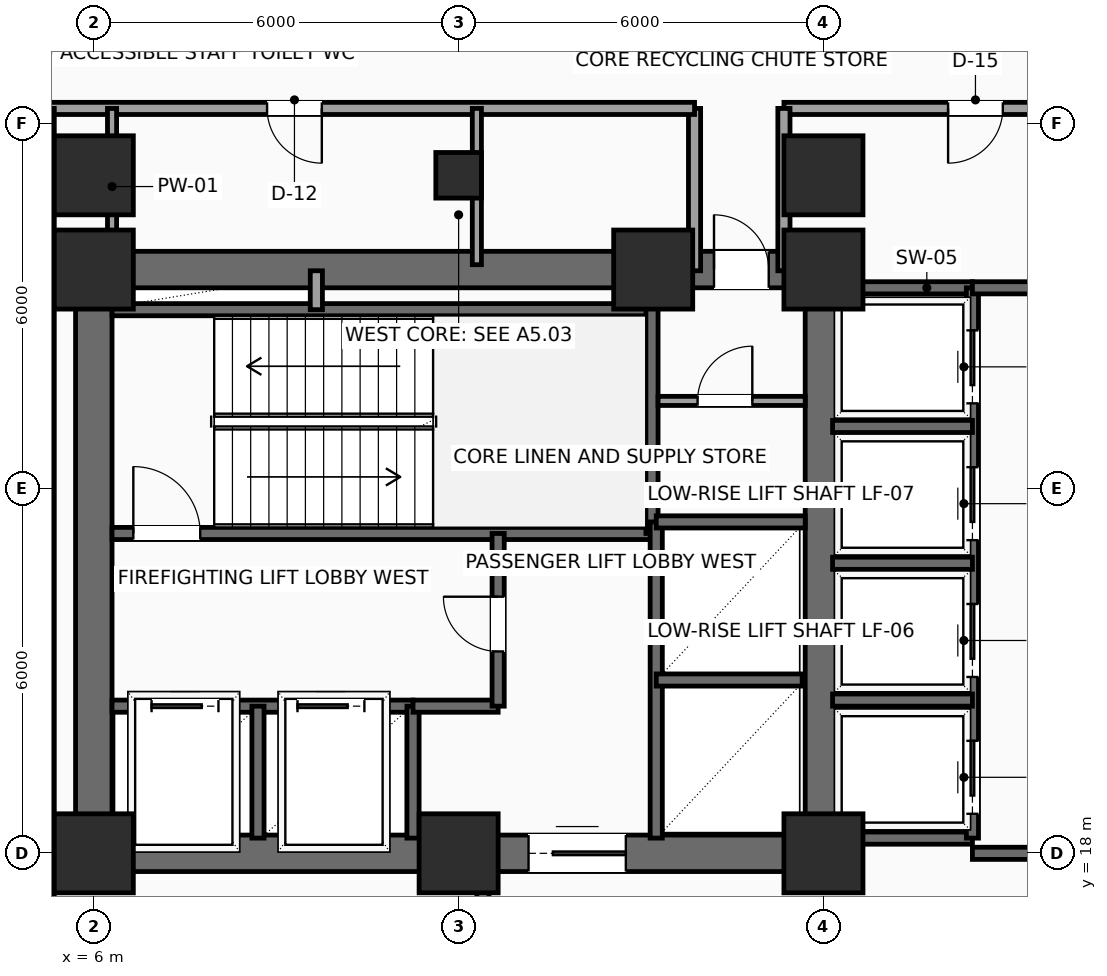
"""IFC4 building model, lengths in metres.
Left out: names, types, materials, properties, quantities, classifications, styles, units other than length and angle.
Written with IfcOpenShell. Run it as: python <this file> out.ifc"""

import sys

from ifc_helpers import new_model, si_unit, direction, frame, frame_2d, origin, origin_2d, place, context, subcontext, project, spatial, rectangle, hollow_rectangle, extrude, element, fill, save


model = new_model("IFC4")
c1 = context("Model", 3, precision=1e-05, world=origin(), true_north=direction((0.0, 1.0)))
c2 = subcontext(c1, "Body", "Model", "MODEL_VIEW")
j1 = project(units=[si_unit("LENGTHUNIT", "METRE"), si_unit("PLANEANGLEUNIT", "RADIAN")], contexts=[c1])
p1 = place(None, origin())
s1 = spatial("IfcSite", under=j1, at=p1, CompositionType="ELEMENT")
p2 = place(p1, origin())
s2 = spatial("IfcBuilding", under=s1, at=p2, CompositionType="ELEMENT")
p3 = place(p2, frame((0.0, 0.0, 48.0)))
s3 = spatial("IfcBuildingStorey", under=s2, at=p3, CompositionType="ELEMENT", Elevation=48.0)
for number, where, z_axis, x_axis in (
    (1, (6.0, 18.0, 0.0), (0.0, 0.0, 1.0), (1.0, 0.0, 0.0)),
    (2, (12.0, 18.0, 0.0), (0.0, 0.0, 1.0), (1.0, 0.0, 0.0)),
    (3, (18.0, 18.0, 0.0), (0.0, 0.0, 1.0), (1.0, 0.0, 0.0)),
    (4, (6.0, 27.6, 0.0), (0.0, 0.0, 1.0), (1.0, 0.0, 0.0)),
    (5, (15.2, 27.6, 0.0), (0.0, 0.0, 1.0), (1.0, 0.0, 0.0)),
    (6, (18.0, 27.6, 0.0), (0.0, 0.0, 1.0), (1.0, 0.0, 0.0)),
    (7, (6.0, 29.15, 0.0), (0.0, 0.0, 1.0), (1.0, 0.0, 0.0)),
):
    element("IfcColumn", number, at=place(p3, frame(where, z_axis=z_axis, x_axis=x_axis)), inside=s3, PredefinedType="COLUMN", context=c2, shape_type="SweptSolid", body=[
        extrude(rectangle(XDim=1.3, YDim=1.3, at=origin_2d()), origin(), (0.0, 0.0, 1.0), 3.9),
    ])
p4 = place(p3, frame((12.0, 29.15, 0.0), z_axis=(0.0, 0.0, 1.0), x_axis=(1.0, 0.0, 0.0)))
e8 = element("IfcColumn", 8, at=p4, inside=s3, PredefinedType="COLUMN", context=c2, shape_type="SweptSolid", body=[
    extrude(hollow_rectangle(XDim=0.75, YDim=0.75, WallThickness=0.035, InnerFilletRadius=0.035, OuterFilletRadius=0.05, at=origin_2d()), origin(), (0.0, 0.0, 1.0), 3.9),
])
p5 = place(p3, frame((18.0, 29.15, 0.0), z_axis=(0.0, 0.0, 1.0), x_axis=(1.0, 0.0, 0.0)))
e9 = element("IfcColumn", 9, at=p5, inside=s3, PredefinedType="COLUMN", context=c2, shape_type="SweptSolid", body=[
    extrude(rectangle(XDim=1.3, YDim=1.3, at=origin_2d()), origin(), (0.0, 0.0, 1.0), 3.9),
])
p6 = place(p3, frame((6.0, 18.0, 0.0), z_axis=(0.0, 0.0, 1.0), x_axis=(1.0, 0.0, 0.0)))
e10 = element("IfcWall", 10, at=p6, inside=s3, PredefinedType="SHEAR", context=c2, shape_type="SweptSolid", body=[
    extrude(rectangle(XDim=12.0, YDim=0.6, at=frame_2d((6.0, 0.0))), origin(), (0.0, 0.0, 1.0), 3.65),
])
p7 = place(p6, frame((7.15, 0.0, 0.0)))
e11 = element("IfcOpeningElement", 11, at=p7, cuts=e10, PredefinedType="OPENING", context=c2, shape_type="SweptSolid", body=[
    extrude(rectangle(XDim=1.6, YDim=2.3, at=frame_2d((0.8, 1.15))), frame((0.0, 0.31, 0.0), z_axis=(0.0, -1.0, 0.0), x_axis=(1.0, 0.0, 0.0)), (0.0, 0.0, 1.0), 0.62),
])
p8 = place(p3, frame((6.0, 27.6, 0.0), z_axis=(0.0, 0.0, 1.0), x_axis=(1.0, 0.0, 0.0)))
e12 = element("IfcWall", 12, at=p8, inside=s3, PredefinedType="SHEAR", context=c2, shape_type="SweptSolid", body=[
    extrude(rectangle(XDim=12.0, YDim=0.6, at=frame_2d((6.0, 0.0))), origin(), (0.0, 0.0, 1.0), 3.65),
])
p9 = place(p8, frame((10.2, 0.0, 0.0)))
e13 = element("IfcOpeningElement", 13, at=p9, cuts=e12, PredefinedType="OPENING", context=c2, shape_type="SweptSolid", body=[
    extrude(rectangle(XDim=0.9, YDim=2.15, at=frame_2d((0.45, 1.075))), frame((0.0, 0.31, 0.0), z_axis=(0.0, -1.0, 0.0), x_axis=(1.0, 0.0, 0.0)), (0.0, 0.0, 1.0), 0.62),
])
for number, where, z_axis, x_axis in (
    (14, (6.0, 18.0, 0.0), (0.0, 0.0, 1.0), (0.0, 1.0, 0.0)),
    (15, (18.0, 18.0, 0.0), (0.0, 0.0, 1.0), (0.0, 1.0, 0.0)),
):
    element("IfcWall", number, at=place(p3, frame(where, z_axis=z_axis, x_axis=x_axis)), inside=s3, PredefinedType="SHEAR", context=c2, shape_type="SweptSolid", body=[
        extrude(rectangle(XDim=9.6, YDim=0.6, at=frame_2d((4.8, 0.0))), origin(), (0.0, 0.0, 1.0), 3.65),
    ])
p10 = place(p3, frame((6.3, 23.26, 0.0), z_axis=(0.0, 0.0, 1.0), x_axis=(1.0, 0.0, 0.0)))
e16 = element("IfcWall", 16, at=p10, inside=s3, PredefinedType="SHEAR", context=c2, shape_type="SweptSolid", body=[
    extrude(rectangle(XDim=8.88, YDim=0.2, at=frame_2d((4.44, 0.0))), origin(), (0.0, 0.0, 1.0), 3.65),
])
p11 = place(p10, frame((0.35, 0.0, 0.0)))
e17 = element("IfcOpeningElement", 17, at=p11, cuts=e16, PredefinedType="OPENING", context=c2, shape_type="SweptSolid", body=[
    extrude(rectangle(XDim=1.1, YDim=2.2, at=frame_2d((0.55, 1.1))), frame((0.0, 0.11, 0.0), z_axis=(0.0, -1.0, 0.0), x_axis=(1.0, 0.0, 0.0)), (0.0, 0.0, 1.0), 0.22),
])
p12 = place(p3, frame((6.3, 26.94, 0.0), z_axis=(0.0, 0.0, 1.0), x_axis=(1.0, 0.0, 0.0)))
e18 = element("IfcWall", 18, at=p12, inside=s3, PredefinedType="SHEAR", context=c2, shape_type="SweptSolid", body=[
    extrude(rectangle(XDim=8.88, YDim=0.2, at=frame_2d((4.44, 0.0))), origin(), (0.0, 0.0, 1.0), 3.65),
])
p13 = place(p3, frame((15.18, 23.26, 0.0), z_axis=(0.0, 0.0, 1.0), x_axis=(0.0, 1.0, 0.0)))
e19 = element("IfcWall", 19, at=p13, inside=s3, PredefinedType="SHEAR", context=c2, shape_type="SweptSolid", body=[
    extrude(rectangle(XDim=4.04, YDim=0.2, at=frame_2d((2.02, 0.0))), origin(), (0.0, 0.0, 1.0), 3.65),
])
p14 = place(p3, frame((6.3, 20.42, 0.0), z_axis=(0.0, 0.0, 1.0), x_axis=(1.0, 0.0, 0.0)))
e20 = element("IfcWall", 20, at=p14, inside=s3, PredefinedType="SHEAR", context=c2, shape_type="SweptSolid", body=[
    extrude(rectangle(XDim=4.95, YDim=0.2, at=frame_2d((2.475, 0.0))), origin(), (0.0, 0.0, 1.0), 3.65),
])
p15 = place(p14, frame((0.65, 0.0, 0.0)))
e21 = element("IfcOpeningElement", 21, at=p15, cuts=e20, PredefinedType="OPENING", context=c2, shape_type="SweptSolid", body=[
    extrude(rectangle(XDim=1.1, YDim=2.2, at=frame_2d((0.55, 1.1))), frame((0.0, 0.11, 0.0), z_axis=(0.0, -1.0, 0.0), x_axis=(1.0, 0.0, 0.0)), (0.0, 0.0, 1.0), 0.22),
])
p16 = place(p14, frame((3.05, 0.0, 0.0)))
e22 = element("IfcOpeningElement", 22, at=p16, cuts=e20, PredefinedType="OPENING", context=c2, shape_type="SweptSolid", body=[
    extrude(rectangle(XDim=1.1, YDim=2.2, at=frame_2d((0.55, 1.1))), frame((0.0, 0.11, 0.0), z_axis=(0.0, -1.0, 0.0), x_axis=(1.0, 0.0, 0.0)), (0.0, 0.0, 1.0), 0.22),
])
for number, where, z_axis, x_axis in (
    (23, (8.7, 18.25, 0.0), (0.0, 0.0, 1.0), (0.0, 1.0, 0.0)),
    (24, (11.25, 18.25, 0.0), (0.0, 0.0, 1.0), (0.0, 1.0, 0.0)),
):
    element("IfcWall", number, at=place(p3, frame(where, z_axis=z_axis, x_axis=x_axis)), inside=s3, PredefinedType="SHEAR", context=c2, shape_type="SweptSolid", body=[
        extrude(rectangle(XDim=2.17, YDim=0.2, at=frame_2d((1.085, 0.0))), origin(), (0.0, 0.0, 1.0), 3.65),
    ])
p17 = place(p3, frame((11.25, 20.42, 0.0), z_axis=(0.0, 0.0, 1.0), x_axis=(1.0, 0.0, 0.0)))
e25 = element("IfcWall", 25, at=p17, inside=s3, PredefinedType="SHEAR", context=c2, shape_type="SweptSolid", body=[
    extrude(rectangle(XDim=1.4, YDim=0.2, at=frame_2d((0.7, 0.0))), origin(), (0.0, 0.0, 1.0), 3.65),
])
p18 = place(p3, frame((12.65, 20.42, 0.0), z_axis=(0.0, 0.0, 1.0), x_axis=(0.0, 1.0, 0.0)))
e26 = element("IfcWall", 26, at=p18, inside=s3, PredefinedType="SHEAR", context=c2, shape_type="SweptSolid", body=[
    extrude(rectangle(XDim=2.84, YDim=0.2, at=frame_2d((1.42, 0.0))), origin(), (0.0, 0.0, 1.0), 3.65),
])
p19 = place(p18, frame((0.9, 0.0, 0.0)))
e27 = element("IfcOpeningElement", 27, at=p19, cuts=e26, PredefinedType="OPENING", context=c2, shape_type="SweptSolid", body=[
    extrude(rectangle(XDim=0.9, YDim=2.15, at=frame_2d((0.45, 1.075))), frame((0.0, 0.11, 0.0), z_axis=(0.0, -1.0, 0.0), x_axis=(1.0, 0.0, 0.0)), (0.0, 0.0, 1.0), 0.22),
])
p20 = place(p3, frame((9.66, 26.94, 0.0), z_axis=(0.0, 0.0, 1.0), x_axis=(0.0, 1.0, 0.0)))
e28 = element("IfcWall", 28, at=p20, inside=s3, PredefinedType="SOLIDWALL", context=c2, shape_type="SweptSolid", body=[
    extrude(rectangle(XDim=0.64, YDim=0.2, at=frame_2d((0.32, 0.0))), origin(), (0.0, 0.0, 1.0), 3.65),
])
p21 = place(p3, frame((15.25, 18.25, 0.0), z_axis=(0.0, 0.0, 1.0), x_axis=(0.0, 1.0, 0.0)))
e29 = element("IfcWall", 29, at=p21, inside=s3, PredefinedType="SHEAR", context=c2, shape_type="SweptSolid", body=[
    extrude(rectangle(XDim=5.2, YDim=0.2, at=frame_2d((2.6, 0.0))), origin(), (0.0, 0.0, 1.0), 3.65),
])
p22 = place(p3, frame((15.25, 20.85, 0.0), z_axis=(0.0, 0.0, 1.0), x_axis=(1.0, 0.0, 0.0)))
e30 = element("IfcWall", 30, at=p22, inside=s3, PredefinedType="SHEAR", context=c2, shape_type="SweptSolid", body=[
    extrude(rectangle(XDim=2.4, YDim=0.2, at=frame_2d((1.2, 0.0))), origin(), (0.0, 0.0, 1.0), 3.65),
])
p23 = place(p3, frame((15.25, 23.45, 0.0), z_axis=(0.0, 0.0, 1.0), x_axis=(1.0, 0.0, 0.0)))
e31 = element("IfcWall", 31, at=p23, inside=s3, PredefinedType="SHEAR", context=c2, shape_type="SweptSolid", body=[
    extrude(rectangle(XDim=2.45, YDim=0.2, at=frame_2d((1.225, 0.0))), origin(), (0.0, 0.0, 1.0), 3.65),
])
p24 = place(p3, frame((15.28, 25.44, 0.0), z_axis=(0.0, 0.0, 1.0), x_axis=(1.0, 0.0, 0.0)))
e32 = element("IfcWall", 32, at=p24, inside=s3, PredefinedType="PARTITIONING", context=c2, shape_type="SweptSolid", body=[
    extrude(rectangle(XDim=2.42, YDim=0.15, at=frame_2d((1.21, 0.0))), origin(), (0.0, 0.0, 1.0), 3.65),
])
p25 = place(p24, frame((0.65, 0.0, 0.0)))
e33 = element("IfcOpeningElement", 33, at=p25, cuts=e32, PredefinedType="OPENING", context=c2, shape_type="SweptSolid", body=[
    extrude(rectangle(XDim=0.9, YDim=2.15, at=frame_2d((0.45, 1.075))), frame((0.0, 0.085, 0.0), z_axis=(0.0, -1.0, 0.0), x_axis=(1.0, 0.0, 0.0)), (0.0, 0.0, 1.0), 0.17),
])
for number, where, z_axis, x_axis in (
    (34, (18.1, 27.3, 0.0), (0.0, 0.0, 1.0), (1.0, 0.0, 0.0)),
    (35, (18.1, 18.25, 0.0), (0.0, 0.0, 1.0), (1.0, 0.0, 0.0)),
):
    element("IfcWall", number, at=place(p3, frame(where, z_axis=z_axis, x_axis=x_axis)), inside=s3, PredefinedType="SHEAR", context=c2, shape_type="SweptSolid", body=[
        extrude(rectangle(XDim=2.35, YDim=0.2, at=frame_2d((1.175, 0.0))), origin(), (0.0, 0.0, 1.0), 3.65),
    ])
p26 = place(p3, frame((20.45, 18.25, 0.0), z_axis=(0.0, 0.0, 1.0), x_axis=(0.0, 1.0, 0.0)))
e36 = element("IfcWall", 36, at=p26, inside=s3, PredefinedType="SHEAR", context=c2, shape_type="SweptSolid", body=[
    extrude(rectangle(XDim=9.05, YDim=0.2, at=frame_2d((4.525, 0.0))), origin(), (0.0, 0.0, 1.0), 3.65),
])
p27 = place(p26, frame((0.4, 0.0, 0.0)))
e37 = element("IfcOpeningElement", 37, at=p27, cuts=e36, PredefinedType="OPENING", context=c2, shape_type="SweptSolid", body=[
    extrude(rectangle(XDim=1.2, YDim=2.2, at=frame_2d((0.6, 1.1))), frame((0.0, 0.11, 0.0), z_axis=(0.0, -1.0, 0.0), x_axis=(1.0, 0.0, 0.0)), (0.0, 0.0, 1.0), 0.22),
])
p28 = place(p26, frame((2.65, 0.0, 0.0)))
e38 = element("IfcOpeningElement", 38, at=p28, cuts=e36, PredefinedType="OPENING", context=c2, shape_type="SweptSolid", body=[
    extrude(rectangle(XDim=1.2, YDim=2.2, at=frame_2d((0.6, 1.1))), frame((0.0, 0.11, 0.0), z_axis=(0.0, -1.0, 0.0), x_axis=(1.0, 0.0, 0.0)), (0.0, 0.0, 1.0), 0.22),
])
p29 = place(p26, frame((4.9, 0.0, 0.0)))
e39 = element("IfcOpeningElement", 39, at=p29, cuts=e36, PredefinedType="OPENING", context=c2, shape_type="SweptSolid", body=[
    extrude(rectangle(XDim=1.2, YDim=2.2, at=frame_2d((0.6, 1.1))), frame((0.0, 0.11, 0.0), z_axis=(0.0, -1.0, 0.0), x_axis=(1.0, 0.0, 0.0)), (0.0, 0.0, 1.0), 0.22),
])
p30 = place(p26, frame((7.15, 0.0, 0.0)))
e40 = element("IfcOpeningElement", 40, at=p30, cuts=e36, PredefinedType="OPENING", context=c2, shape_type="SweptSolid", body=[
    extrude(rectangle(XDim=1.2, YDim=2.2, at=frame_2d((0.6, 1.1))), frame((0.0, 0.11, 0.0), z_axis=(0.0, -1.0, 0.0), x_axis=(1.0, 0.0, 0.0)), (0.0, 0.0, 1.0), 0.22),
])
for number, where, z_axis, x_axis in (
    (41, (18.15, 20.52, 0.0), (0.0, 0.0, 1.0), (1.0, 0.0, 0.0)),
    (42, (18.15, 22.77, 0.0), (0.0, 0.0, 1.0), (1.0, 0.0, 0.0)),
    (43, (18.15, 25.02, 0.0), (0.0, 0.0, 1.0), (1.0, 0.0, 0.0)),
):
    element("IfcWall", number, at=place(p3, frame(where, z_axis=z_axis, x_axis=x_axis)), inside=s3, PredefinedType="SHEAR", context=c2, shape_type="SweptSolid", body=[
        extrude(rectangle(XDim=2.3, YDim=0.2, at=frame_2d((1.15, 0.0))), origin(), (0.0, 0.0, 1.0), 3.65),
    ])
p31 = place(p3, frame((20.45, 18.0, 0.0), z_axis=(0.0, 0.0, 1.0), x_axis=(1.0, 0.0, 0.0)))
e44 = element("IfcWall", 44, at=p31, inside=s3, PredefinedType="SHEAR", context=c2, shape_type="SweptSolid", body=[
    extrude(rectangle(XDim=3.5, YDim=0.2, at=frame_2d((1.75, 0.0))), origin(), (0.0, 0.0, 1.0), 3.65),
])
p32 = place(p31, frame((0.95, 0.0, 0.0)))
e45 = element("IfcOpeningElement", 45, at=p32, cuts=e44, PredefinedType="OPENING", context=c2, shape_type="SweptSolid", body=[
    extrude(rectangle(XDim=1.6, YDim=2.3, at=frame_2d((0.8, 1.15))), frame((0.0, 0.11, 0.0), z_axis=(0.0, -1.0, 0.0), x_axis=(1.0, 0.0, 0.0)), (0.0, 0.0, 1.0), 0.22),
])
p33 = place(p3, frame((20.45, 27.3, 0.0), z_axis=(0.0, 0.0, 1.0), x_axis=(1.0, 0.0, 0.0)))
e46 = element("IfcWall", 46, at=p33, inside=s3, PredefinedType="SHEAR", context=c2, shape_type="SweptSolid", body=[
    extrude(rectangle(XDim=3.5, YDim=0.2, at=frame_2d((1.75, 0.0))), origin(), (0.0, 0.0, 1.0), 3.65),
])
p34 = place(p3, frame((23.7, 30.25, 0.0), z_axis=(0.0, 0.0, 1.0), x_axis=(-1.0, 0.0, 0.0)))
e47 = element("IfcWall", 47, at=p34, inside=s3, PredefinedType="PARTITIONING", context=c2, shape_type="SweptSolid", body=[
    extrude(rectangle(XDim=6.35, YDim=0.2, at=frame_2d((3.175, 0.0))), origin(), (0.0, 0.0, 1.0), 3.65),
])
p35 = place(p34, frame((2.75, 0.0, 0.0)))
e48 = element("IfcOpeningElement", 48, at=p35, cuts=e47, PredefinedType="OPENING", context=c2, shape_type="SweptSolid", body=[
    extrude(rectangle(XDim=0.9, YDim=2.1, at=frame_2d((0.45, 1.05))), frame((0.0, 0.11, 0.0), z_axis=(0.0, -1.0, 0.0), x_axis=(1.0, 0.0, 0.0)), (0.0, 0.0, 1.0), 0.22),
])
for number, where, z_axis, x_axis in (
    (49, (17.35, 30.25, 0.0), (0.0, 0.0, 1.0), (0.0, -1.0, 0.0)),
    (50, (15.88, 27.58, 0.0), (0.0, 0.0, 1.0), (0.0, 1.0, 0.0)),
):
    element("IfcWall", number, at=place(p3, frame(where, z_axis=z_axis, x_axis=x_axis)), inside=s3, PredefinedType="PARTITIONING", context=c2, shape_type="SweptSolid", body=[
        extrude(rectangle(XDim=2.67, YDim=0.2, at=frame_2d((1.335, 0.0))), origin(), (0.0, 0.0, 1.0), 3.65),
    ])
p36 = place(p3, frame((15.88, 30.25, 0.0), z_axis=(0.0, 0.0, 1.0), x_axis=(-1.0, 0.0, 0.0)))
e51 = element("IfcWall", 51, at=p36, inside=s3, PredefinedType="PARTITIONING", context=c2, shape_type="SweptSolid", body=[
    extrude(rectangle(XDim=10.63, YDim=0.2, at=frame_2d((5.315, 0.0))), origin(), (0.0, 0.0, 1.0), 3.65),
])
p37 = place(p36, frame((6.13, 0.0, 0.0)))
e52 = element("IfcOpeningElement", 52, at=p37, cuts=e51, PredefinedType="OPENING", context=c2, shape_type="SweptSolid", body=[
    extrude(rectangle(XDim=0.9, YDim=2.1, at=frame_2d((0.45, 1.05))), frame((0.0, 0.11, 0.0), z_axis=(0.0, -1.0, 0.0), x_axis=(1.0, 0.0, 0.0)), (0.0, 0.0, 1.0), 0.22),
])
p38 = place(p3, frame((5.25, 30.25, 0.0), z_axis=(0.0, 0.0, 1.0), x_axis=(0.0, -1.0, 0.0)))
e53 = element("IfcWall", 53, at=p38, inside=s3, PredefinedType="PARTITIONING", context=c2, shape_type="SweptSolid", body=[
    extrude(rectangle(XDim=13.35, YDim=0.2, at=frame_2d((6.675, 0.0))), origin(), (0.0, 0.0, 1.0), 3.65),
])
p39 = place(p3, frame((12.4, 16.9, 0.0), z_axis=(0.0, 0.0, 1.0), x_axis=(0.0, 1.0, 0.0)))
e54 = element("IfcWall", 54, at=p39, inside=s3, PredefinedType="PARTITIONING", context=c2, shape_type="SweptSolid", body=[
    extrude(rectangle(XDim=1.05, YDim=0.2, at=frame_2d((0.525, 0.0))), origin(), (0.0, 0.0, 1.0), 3.65),
])
for number, where, z_axis, x_axis in (
    (55, (6.3, 27.68, 0.0), (0.0, 0.0, 1.0), (0.0, 1.0, 0.0)),
    (56, (12.3, 27.68, 0.0), (0.0, 0.0, 1.0), (0.0, 1.0, 0.0)),
):
    element("IfcWall", number, at=place(p3, frame(where, z_axis=z_axis, x_axis=x_axis)), inside=s3, PredefinedType="PARTITIONING", context=c2, shape_type="SweptSolid", body=[
        extrude(rectangle(XDim=2.57, YDim=0.15, at=frame_2d((1.285, 0.0))), origin(), (0.0, 0.0, 1.0), 2.992),
    ])
p40 = place(p7, origin())
e57 = element("IfcDoor", 57, at=p40, inside=s3, OperationType="DOUBLE_DOOR_SLIDING", PredefinedType="DOOR", context=c2, shape_type="SweptSolid", body=[
    extrude(rectangle(XDim=1.6, YDim=2.3, at=frame_2d((0.8, 1.15))), frame((0.0, 0.025, 0.0), z_axis=(0.0, -1.0, 0.0), x_axis=(1.0, 0.0, 0.0)), (0.0, 0.0, 1.0), 0.05),
])
fill(e11, e57)
p41 = place(p9, origin())
e58 = element("IfcDoor", 58, at=p41, inside=s3, OperationType="SINGLE_SWING_LEFT", PredefinedType="DOOR", context=c2, shape_type="SweptSolid", body=[
    extrude(rectangle(XDim=0.9, YDim=2.15, at=frame_2d((0.45, 1.075))), frame((0.0, 0.025, 0.0), z_axis=(0.0, -1.0, 0.0), x_axis=(1.0, 0.0, 0.0)), (0.0, 0.0, 1.0), 0.05),
])
fill(e13, e58)
p42 = place(p11, origin())
e59 = element("IfcDoor", 59, at=p42, inside=s3, OperationType="SINGLE_SWING_LEFT", PredefinedType="DOOR", context=c2, shape_type="SweptSolid", body=[
    extrude(rectangle(XDim=1.1, YDim=2.2, at=frame_2d((0.55, 1.1))), frame((0.0, 0.025, 0.0), z_axis=(0.0, -1.0, 0.0), x_axis=(1.0, 0.0, 0.0)), (0.0, 0.0, 1.0), 0.05),
])
fill(e17, e59)
p43 = place(p15, origin())
e60 = element("IfcDoor", 60, at=p43, inside=s3, OperationType="SLIDING_TO_LEFT", PredefinedType="DOOR", context=c2, shape_type="SweptSolid", body=[
    extrude(rectangle(XDim=1.1, YDim=2.2, at=frame_2d((0.55, 1.1))), frame((0.0, 0.025, 0.0), z_axis=(0.0, -1.0, 0.0), x_axis=(1.0, 0.0, 0.0)), (0.0, 0.0, 1.0), 0.05),
])
fill(e21, e60)
p44 = place(p16, origin())
e61 = element("IfcDoor", 61, at=p44, inside=s3, OperationType="SLIDING_TO_LEFT", PredefinedType="DOOR", context=c2, shape_type="SweptSolid", body=[
    extrude(rectangle(XDim=1.1, YDim=2.2, at=frame_2d((0.55, 1.1))), frame((0.0, 0.025, 0.0), z_axis=(0.0, -1.0, 0.0), x_axis=(1.0, 0.0, 0.0)), (0.0, 0.0, 1.0), 0.05),
])
fill(e22, e61)
p45 = place(p19, origin())
e62 = element("IfcDoor", 62, at=p45, inside=s3, OperationType="SINGLE_SWING_RIGHT", PredefinedType="DOOR", context=c2, shape_type="SweptSolid", body=[
    extrude(rectangle(XDim=0.9, YDim=2.15, at=frame_2d((0.45, 1.075))), frame((0.0, 0.025, 0.0), z_axis=(0.0, -1.0, 0.0), x_axis=(1.0, 0.0, 0.0)), (0.0, 0.0, 1.0), 0.05),
])
fill(e27, e62)
p46 = place(p25, origin())
e63 = element("IfcDoor", 63, at=p46, inside=s3, OperationType="SINGLE_SWING_RIGHT", PredefinedType="DOOR", context=c2, shape_type="SweptSolid", body=[
    extrude(rectangle(XDim=0.9, YDim=2.15, at=frame_2d((0.45, 1.075))), frame((0.0, 0.025, 0.0), z_axis=(0.0, -1.0, 0.0), x_axis=(1.0, 0.0, 0.0)), (0.0, 0.0, 1.0), 0.05),
])
fill(e33, e63)
p47 = place(p27, origin())
e64 = element("IfcDoor", 64, at=p47, inside=s3, OperationType="SLIDING_TO_RIGHT", PredefinedType="DOOR", context=c2, shape_type="SweptSolid", body=[
    extrude(rectangle(XDim=1.2, YDim=2.2, at=frame_2d((0.6, 1.1))), frame((0.0, 0.025, 0.0), z_axis=(0.0, -1.0, 0.0), x_axis=(1.0, 0.0, 0.0)), (0.0, 0.0, 1.0), 0.05),
])
fill(e37, e64)
p48 = place(p28, origin())
e65 = element("IfcDoor", 65, at=p48, inside=s3, OperationType="SLIDING_TO_RIGHT", PredefinedType="DOOR", context=c2, shape_type="SweptSolid", body=[
    extrude(rectangle(XDim=1.2, YDim=2.2, at=frame_2d((0.6, 1.1))), frame((0.0, 0.025, 0.0), z_axis=(0.0, -1.0, 0.0), x_axis=(1.0, 0.0, 0.0)), (0.0, 0.0, 1.0), 0.05),
])
fill(e38, e65)
p49 = place(p29, origin())
e66 = element("IfcDoor", 66, at=p49, inside=s3, OperationType="SLIDING_TO_RIGHT", PredefinedType="DOOR", context=c2, shape_type="SweptSolid", body=[
    extrude(rectangle(XDim=1.2, YDim=2.2, at=frame_2d((0.6, 1.1))), frame((0.0, 0.025, 0.0), z_axis=(0.0, -1.0, 0.0), x_axis=(1.0, 0.0, 0.0)), (0.0, 0.0, 1.0), 0.05),
])
fill(e39, e66)
p50 = place(p30, origin())
e67 = element("IfcDoor", 67, at=p50, inside=s3, OperationType="SLIDING_TO_RIGHT", PredefinedType="DOOR", context=c2, shape_type="SweptSolid", body=[
    extrude(rectangle(XDim=1.2, YDim=2.2, at=frame_2d((0.6, 1.1))), frame((0.0, 0.025, 0.0), z_axis=(0.0, -1.0, 0.0), x_axis=(1.0, 0.0, 0.0)), (0.0, 0.0, 1.0), 0.05),
])
fill(e40, e67)
p51 = place(p35, origin())
e68 = element("IfcDoor", 68, at=p51, inside=s3, OperationType="SINGLE_SWING_RIGHT", PredefinedType="DOOR", context=c2, shape_type="SweptSolid", body=[
    extrude(rectangle(XDim=0.9, YDim=2.1, at=frame_2d((0.45, 1.05))), frame((0.0, 0.025, 0.0), z_axis=(0.0, -1.0, 0.0), x_axis=(1.0, 0.0, 0.0)), (0.0, 0.0, 1.0), 0.05),
])
fill(e48, e68)
p52 = place(p37, origin())
e69 = element("IfcDoor", 69, at=p52, inside=s3, OperationType="SINGLE_SWING_LEFT", PredefinedType="DOOR", context=c2, shape_type="SweptSolid", body=[
    extrude(rectangle(XDim=0.9, YDim=2.1, at=frame_2d((0.45, 1.05))), frame((0.0, 0.025, 0.0), z_axis=(0.0, -1.0, 0.0), x_axis=(1.0, 0.0, 0.0)), (0.0, 0.0, 1.0), 0.05),
])
fill(e52, e69)
save(model, sys.argv[1])
